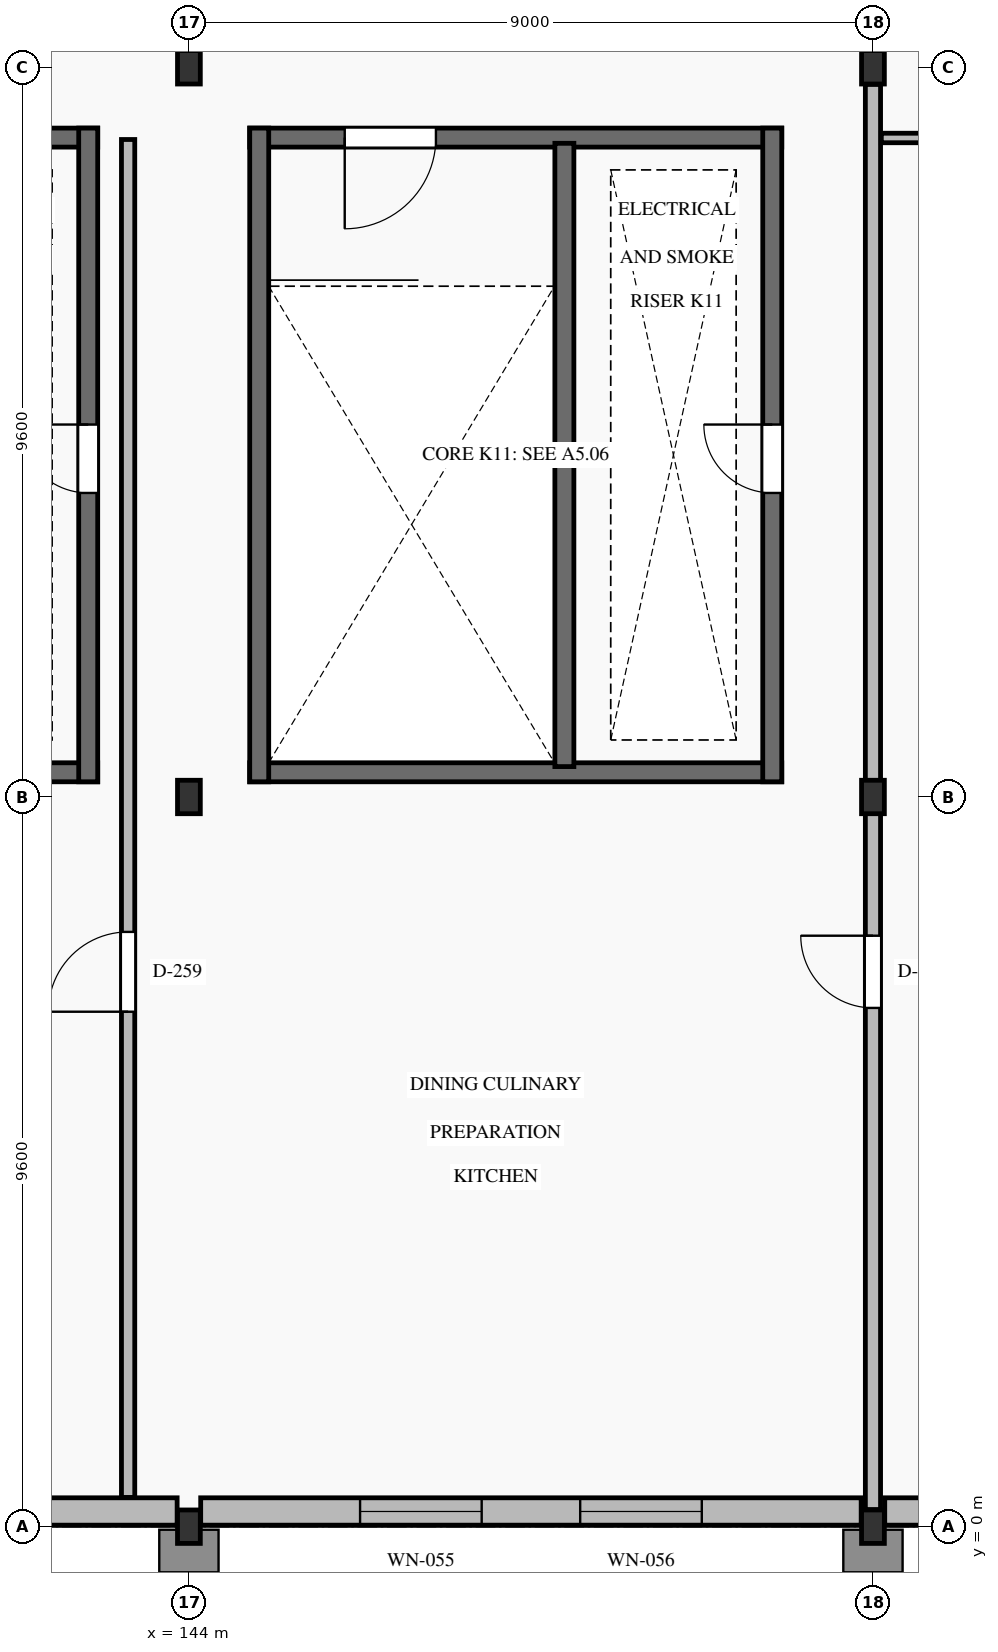
"""IFC4 building model, lengths in metres.
Left out: names, types, materials, properties, quantities, classifications, styles, units other than length and angle.
Written with IfcOpenShell. Run it as: python <this file> out.ifc"""

import sys

from ifc_helpers import new_model, si_unit, direction, frame, frame_2d, origin, origin_2d, place, context, subcontext, project, spatial, rectangle, i_section, extrude, element, fill, save


model = new_model("IFC4")
c1 = context("Model", 3, precision=1e-05, world=origin(), true_north=direction((0.0, 1.0)))
c2 = subcontext(c1, "Body", "Model", "MODEL_VIEW")
j1 = project(units=[si_unit("LENGTHUNIT", "METRE"), si_unit("PLANEANGLEUNIT", "RADIAN")], contexts=[c1])
p1 = place(None, origin())
s1 = spatial("IfcSite", under=j1, at=p1, CompositionType="ELEMENT")
p2 = place(p1, origin())
s2 = spatial("IfcBuilding", under=s1, at=p2, CompositionType="ELEMENT")
p3 = place(p2, frame((0.0, 0.0, 10.8)))
s3 = spatial("IfcBuildingStorey", under=s2, at=p3, CompositionType="ELEMENT", Elevation=10.8)
for number, where, z_axis, x_axis in (
    (1, (144.0, 0.0, 0.0), (0.0, 0.0, 1.0), (1.0, 0.0, 0.0)),
    (2, (144.0, 9.6, 0.0), (0.0, 0.0, 1.0), (1.0, 0.0, 0.0)),
    (3, (144.0, 19.2, 0.0), (0.0, 0.0, 1.0), (1.0, 0.0, 0.0)),
    (4, (153.0, 0.0, 0.0), (0.0, 0.0, 1.0), (1.0, 0.0, 0.0)),
    (5, (153.0, 9.6, 0.0), (0.0, 0.0, 1.0), (1.0, 0.0, 0.0)),
    (6, (153.0, 19.2, 0.0), (0.0, 0.0, 1.0), (1.0, 0.0, 0.0)),
):
    element("IfcColumn", number, at=place(p3, frame(where, z_axis=z_axis, x_axis=x_axis)), inside=s3, PredefinedType="COLUMN", context=c2, shape_type="SweptSolid", body=[
        extrude(i_section(OverallWidth=0.3, OverallDepth=0.44, WebThickness=0.011, FlangeThickness=0.021, FilletRadius=0.027, at=origin_2d()), origin(), (0.0, 0.0, 1.0), 4.2),
    ])
p4 = place(p3, frame((135.155, 0.2, 0.0), z_axis=(0.0, 0.0, 1.0), x_axis=(1.0, 0.0, 0.0)))
e7 = element("IfcWall", 7, at=p4, inside=s3, PredefinedType="SOLIDWALL", context=c2, shape_type="SweptSolid", body=[
    extrude(rectangle(XDim=8.69, YDim=0.36, at=frame_2d((4.345, 0.0))), origin(), (0.0, 0.0, 1.0), 3.69),
])
p5 = place(p4, frame((2.097, 0.0, 0.95)))
e8 = element("IfcOpeningElement", 8, at=p5, cuts=e7, PredefinedType="OPENING", context=c2, shape_type="SweptSolid", body=[
    extrude(rectangle(XDim=1.6, YDim=2.2, at=frame_2d((0.8, 1.1))), frame((0.0, 0.195, 0.0), z_axis=(0.0, -1.0, 0.0), x_axis=(1.0, 0.0, 0.0)), (0.0, 0.0, 1.0), 0.39),
])
p6 = place(p4, frame((4.993, 0.0, 0.95)))
e9 = element("IfcOpeningElement", 9, at=p6, cuts=e7, PredefinedType="OPENING", context=c2, shape_type="SweptSolid", body=[
    extrude(rectangle(XDim=1.6, YDim=2.2, at=frame_2d((0.8, 1.1))), frame((0.0, 0.195, 0.0), z_axis=(0.0, -1.0, 0.0), x_axis=(1.0, 0.0, 0.0)), (0.0, 0.0, 1.0), 0.39),
])
p7 = place(p3, frame((144.155, 0.2, 0.0), z_axis=(0.0, 0.0, 1.0), x_axis=(1.0, 0.0, 0.0)))
e10 = element("IfcWall", 10, at=p7, inside=s3, PredefinedType="SOLIDWALL", context=c2, shape_type="SweptSolid", body=[
    extrude(rectangle(XDim=8.69, YDim=0.36, at=frame_2d((4.345, 0.0))), origin(), (0.0, 0.0, 1.0), 3.665),
])
p8 = place(p7, frame((2.097, 0.0, 0.95)))
e11 = element("IfcOpeningElement", 11, at=p8, cuts=e10, PredefinedType="OPENING", context=c2, shape_type="SweptSolid", body=[
    extrude(rectangle(XDim=1.6, YDim=2.2, at=frame_2d((0.8, 1.1))), frame((0.0, 0.195, 0.0), z_axis=(0.0, -1.0, 0.0), x_axis=(1.0, 0.0, 0.0)), (0.0, 0.0, 1.0), 0.39),
])
p9 = place(p7, frame((4.993, 0.0, 0.95)))
e12 = element("IfcOpeningElement", 12, at=p9, cuts=e10, PredefinedType="OPENING", context=c2, shape_type="SweptSolid", body=[
    extrude(rectangle(XDim=1.6, YDim=2.2, at=frame_2d((0.8, 1.1))), frame((0.0, 0.195, 0.0), z_axis=(0.0, -1.0, 0.0), x_axis=(1.0, 0.0, 0.0)), (0.0, 0.0, 1.0), 0.39),
])
p10 = place(p3, frame((153.155, 0.2, 0.0), z_axis=(0.0, 0.0, 1.0), x_axis=(1.0, 0.0, 0.0)))
e13 = element("IfcWall", 13, at=p10, inside=s3, PredefinedType="SOLIDWALL", context=c2, shape_type="SweptSolid", body=[
    extrude(rectangle(XDim=8.69, YDim=0.36, at=frame_2d((4.345, 0.0))), origin(), (0.0, 0.0, 1.0), 3.665),
])
p11 = place(p10, frame((2.097, 0.0, 0.95)))
e14 = element("IfcOpeningElement", 14, at=p11, cuts=e13, PredefinedType="OPENING", context=c2, shape_type="SweptSolid", body=[
    extrude(rectangle(XDim=1.6, YDim=2.2, at=frame_2d((0.8, 1.1))), frame((0.0, 0.195, 0.0), z_axis=(0.0, -1.0, 0.0), x_axis=(1.0, 0.0, 0.0)), (0.0, 0.0, 1.0), 0.39),
])
p12 = place(p10, frame((4.993, 0.0, 0.95)))
e15 = element("IfcOpeningElement", 15, at=p12, cuts=e13, PredefinedType="OPENING", context=c2, shape_type="SweptSolid", body=[
    extrude(rectangle(XDim=1.6, YDim=2.2, at=frame_2d((0.8, 1.1))), frame((0.0, 0.195, 0.0), z_axis=(0.0, -1.0, 0.0), x_axis=(1.0, 0.0, 0.0)), (0.0, 0.0, 1.0), 0.39),
])
p13 = place(p3, frame((135.8, 9.925, 0.0), z_axis=(0.0, 0.0, 1.0), x_axis=(1.0, 0.0, 0.0)))
e16 = element("IfcWall", 16, at=p13, inside=s3, PredefinedType="SHEAR", context=c2, shape_type="SweptSolid", body=[
    extrude(rectangle(XDim=7.0, YDim=0.25, at=frame_2d((3.5, 0.0))), origin(), (0.0, 0.0, 1.0), 4.2),
])
p14 = place(p3, frame((135.8, 18.275, 0.0), z_axis=(0.0, 0.0, 1.0), x_axis=(1.0, 0.0, 0.0)))
e17 = element("IfcWall", 17, at=p14, inside=s3, PredefinedType="SHEAR", context=c2, shape_type="SweptSolid", body=[
    extrude(rectangle(XDim=7.0, YDim=0.25, at=frame_2d((3.5, 0.0))), origin(), (0.0, 0.0, 1.0), 4.2),
])
p15 = place(p14, frame((1.25, 0.0, 0.0)))
e18 = element("IfcOpeningElement", 18, at=p15, cuts=e17, PredefinedType="OPENING", context=c2, shape_type="SweptSolid", body=[
    extrude(rectangle(XDim=1.2, YDim=2.15, at=frame_2d((0.6, 1.075))), frame((0.0, 0.14, 0.0), z_axis=(0.0, -1.0, 0.0), x_axis=(1.0, 0.0, 0.0)), (0.0, 0.0, 1.0), 0.28),
])
p16 = place(p3, frame((142.675, 9.8, 0.0), z_axis=(0.0, 0.0, 1.0), x_axis=(0.0, 1.0, 0.0)))
e19 = element("IfcWall", 19, at=p16, inside=s3, PredefinedType="SHEAR", context=c2, shape_type="SweptSolid", body=[
    extrude(rectangle(XDim=8.6, YDim=0.25, at=frame_2d((4.3, 0.0))), origin(), (0.0, 0.0, 1.0), 4.2),
])
p17 = place(p16, frame((3.8, 0.0, 0.0)))
e20 = element("IfcOpeningElement", 20, at=p17, cuts=e19, PredefinedType="OPENING", context=c2, shape_type="SweptSolid", body=[
    extrude(rectangle(XDim=0.9, YDim=2.05, at=frame_2d((0.45, 1.025))), frame((0.0, 0.14, 0.0), z_axis=(0.0, -1.0, 0.0), x_axis=(1.0, 0.0, 0.0)), (0.0, 0.0, 1.0), 0.28),
])
p18 = place(p3, frame((144.8, 9.925, 0.0), z_axis=(0.0, 0.0, 1.0), x_axis=(1.0, 0.0, 0.0)))
e21 = element("IfcWall", 21, at=p18, inside=s3, PredefinedType="SHEAR", context=c2, shape_type="SweptSolid", body=[
    extrude(rectangle(XDim=7.0, YDim=0.25, at=frame_2d((3.5, 0.0))), origin(), (0.0, 0.0, 1.0), 4.2),
])
p19 = place(p3, frame((144.8, 18.275, 0.0), z_axis=(0.0, 0.0, 1.0), x_axis=(1.0, 0.0, 0.0)))
e22 = element("IfcWall", 22, at=p19, inside=s3, PredefinedType="SHEAR", context=c2, shape_type="SweptSolid", body=[
    extrude(rectangle(XDim=7.0, YDim=0.25, at=frame_2d((3.5, 0.0))), origin(), (0.0, 0.0, 1.0), 4.2),
])
p20 = place(p19, frame((1.25, 0.0, 0.0)))
e23 = element("IfcOpeningElement", 23, at=p20, cuts=e22, PredefinedType="OPENING", context=c2, shape_type="SweptSolid", body=[
    extrude(rectangle(XDim=1.2, YDim=2.15, at=frame_2d((0.6, 1.075))), frame((0.0, 0.14, 0.0), z_axis=(0.0, -1.0, 0.0), x_axis=(1.0, 0.0, 0.0)), (0.0, 0.0, 1.0), 0.28),
])
p21 = place(p3, frame((144.925, 9.8, 0.0), z_axis=(0.0, 0.0, 1.0), x_axis=(0.0, 1.0, 0.0)))
e24 = element("IfcWall", 24, at=p21, inside=s3, PredefinedType="SHEAR", context=c2, shape_type="SweptSolid", body=[
    extrude(rectangle(XDim=8.6, YDim=0.25, at=frame_2d((4.3, 0.0))), origin(), (0.0, 0.0, 1.0), 4.2),
])
p22 = place(p3, frame((151.675, 9.8, 0.0), z_axis=(0.0, 0.0, 1.0), x_axis=(0.0, 1.0, 0.0)))
e25 = element("IfcWall", 25, at=p22, inside=s3, PredefinedType="SHEAR", context=c2, shape_type="SweptSolid", body=[
    extrude(rectangle(XDim=8.6, YDim=0.25, at=frame_2d((4.3, 0.0))), origin(), (0.0, 0.0, 1.0), 4.2),
])
p23 = place(p22, frame((3.8, 0.0, 0.0)))
e26 = element("IfcOpeningElement", 26, at=p23, cuts=e25, PredefinedType="OPENING", context=c2, shape_type="SweptSolid", body=[
    extrude(rectangle(XDim=0.9, YDim=2.05, at=frame_2d((0.45, 1.025))), frame((0.0, 0.14, 0.0), z_axis=(0.0, -1.0, 0.0), x_axis=(1.0, 0.0, 0.0)), (0.0, 0.0, 1.0), 0.28),
])
p24 = place(p3, frame((148.94, 10.0, 0.0), z_axis=(0.0, 0.0, 1.0), x_axis=(0.0, 1.0, 0.0)))
e27 = element("IfcWall", 27, at=p24, inside=s3, PredefinedType="SHEAR", context=c2, shape_type="SweptSolid", body=[
    extrude(rectangle(XDim=8.2, YDim=0.25, at=frame_2d((4.1, 0.0))), origin(), (0.0, 0.0, 1.0), 4.2),
])
p25 = place(p3, frame((143.2, 0.385, 0.0), z_axis=(0.0, 0.0, 1.0), x_axis=(0.0, 1.0, 0.0)))
e28 = element("IfcWall", 28, at=p25, inside=s3, PredefinedType="PARTITIONING", context=c2, shape_type="SweptSolid", body=[
    extrude(rectangle(XDim=17.865, YDim=0.175, at=frame_2d((8.933, 0.0))), origin(), (0.0, 0.0, 1.0), 3.94),
])
p26 = place(p25, frame((6.39, 0.0, 0.0)))
e29 = element("IfcOpeningElement", 29, at=p26, cuts=e28, PredefinedType="OPENING", context=c2, shape_type="SweptSolid", body=[
    extrude(rectangle(XDim=1.05, YDim=2.2, at=frame_2d((0.525, 1.1))), frame((0.0, 0.103, 0.0), z_axis=(0.0, -1.0, 0.0), x_axis=(1.0, 0.0, 0.0)), (0.0, 0.0, 1.0), 0.205),
])
p27 = place(p3, frame((153.0, 0.225, 0.0), z_axis=(0.0, 0.0, 1.0), x_axis=(0.0, 1.0, 0.0)))
e30 = element("IfcWall", 30, at=p27, inside=s3, PredefinedType="PARTITIONING", context=c2, shape_type="SweptSolid", body=[
    extrude(rectangle(XDim=18.75, YDim=0.2, at=frame_2d((9.375, 0.0))), origin(), (0.0, 0.0, 1.0), 3.615),
])
p28 = place(p27, frame((6.6, 0.0, 0.0)))
e31 = element("IfcOpeningElement", 31, at=p28, cuts=e30, PredefinedType="OPENING", context=c2, shape_type="SweptSolid", body=[
    extrude(rectangle(XDim=0.95, YDim=2.1, at=frame_2d((0.475, 1.05))), frame((0.0, 0.115, 0.0), z_axis=(0.0, -1.0, 0.0), x_axis=(1.0, 0.0, 0.0)), (0.0, 0.0, 1.0), 0.23),
])
p29 = place(p3, frame((153.11, 18.27, 0.0), z_axis=(0.0, 0.0, 1.0), x_axis=(1.0, 0.0, 0.0)))
e32 = element("IfcWall", 32, at=p29, inside=s3, PredefinedType="PARTITIONING", context=c2, shape_type="SweptSolid", body=[
    extrude(rectangle(XDim=0.68, YDim=0.125, at=frame_2d((0.34, 0.0))), origin(), (0.0, 0.0, 1.0), 3.94),
])
p30 = place(p8, origin())
e33 = element("IfcWindow", 33, at=p30, inside=s3, PartitioningType="SINGLE_PANEL", PredefinedType="WINDOW", context=c2, shape_type="SweptSolid", body=[
    extrude(rectangle(XDim=1.6, YDim=2.2, at=frame_2d((0.8, 1.1))), frame((0.0, 0.03, 0.0), z_axis=(0.0, -1.0, 0.0), x_axis=(1.0, 0.0, 0.0)), (0.0, 0.0, 1.0), 0.06),
])
fill(e11, e33)
p31 = place(p9, origin())
e34 = element("IfcWindow", 34, at=p31, inside=s3, PartitioningType="SINGLE_PANEL", PredefinedType="WINDOW", context=c2, shape_type="SweptSolid", body=[
    extrude(rectangle(XDim=1.6, YDim=2.2, at=frame_2d((0.8, 1.1))), frame((0.0, 0.03, 0.0), z_axis=(0.0, -1.0, 0.0), x_axis=(1.0, 0.0, 0.0)), (0.0, 0.0, 1.0), 0.06),
])
fill(e12, e34)
p32 = place(p17, origin())
e35 = element("IfcDoor", 35, at=p32, inside=s3, OperationType="SINGLE_SWING_RIGHT", PredefinedType="DOOR", context=c2, shape_type="SweptSolid", body=[
    extrude(rectangle(XDim=0.9, YDim=2.05, at=frame_2d((0.45, 1.025))), frame((0.0, 0.025, 0.0), z_axis=(0.0, -1.0, 0.0), x_axis=(1.0, 0.0, 0.0)), (0.0, 0.0, 1.0), 0.05),
])
fill(e20, e35)
p33 = place(p20, frame((1.2, 0.0, 0.0), z_axis=(0.0, 0.0, 1.0), x_axis=(-1.0, 0.0, 0.0)))
e36 = element("IfcDoor", 36, at=p33, inside=s3, OperationType="SINGLE_SWING_LEFT", PredefinedType="DOOR", context=c2, shape_type="SweptSolid", body=[
    extrude(rectangle(XDim=1.2, YDim=2.15, at=frame_2d((0.6, 1.075))), frame((0.0, 0.025, 0.0), z_axis=(0.0, -1.0, 0.0), x_axis=(1.0, 0.0, 0.0)), (0.0, 0.0, 1.0), 0.05),
])
fill(e23, e36)
p34 = place(p23, origin())
e37 = element("IfcDoor", 37, at=p34, inside=s3, OperationType="SINGLE_SWING_RIGHT", PredefinedType="DOOR", context=c2, shape_type="SweptSolid", body=[
    extrude(rectangle(XDim=0.9, YDim=2.05, at=frame_2d((0.45, 1.025))), frame((0.0, 0.025, 0.0), z_axis=(0.0, -1.0, 0.0), x_axis=(1.0, 0.0, 0.0)), (0.0, 0.0, 1.0), 0.05),
])
fill(e26, e37)
p35 = place(p26, origin())
e38 = element("IfcDoor", 38, at=p35, inside=s3, OperationType="SINGLE_SWING_LEFT", PredefinedType="DOOR", context=c2, shape_type="SweptSolid", body=[
    extrude(rectangle(XDim=1.05, YDim=2.2, at=frame_2d((0.525, 1.1))), frame((0.0, 0.025, 0.0), z_axis=(0.0, -1.0, 0.0), x_axis=(1.0, 0.0, 0.0)), (0.0, 0.0, 1.0), 0.05),
])
fill(e29, e38)
p36 = place(p28, origin())
e39 = element("IfcDoor", 39, at=p36, inside=s3, OperationType="SINGLE_SWING_RIGHT", PredefinedType="DOOR", context=c2, shape_type="SweptSolid", body=[
    extrude(rectangle(XDim=0.95, YDim=2.1, at=frame_2d((0.475, 1.05))), frame((0.0, 0.025, 0.0), z_axis=(0.0, -1.0, 0.0), x_axis=(1.0, 0.0, 0.0)), (0.0, 0.0, 1.0), 0.05),
])
fill(e31, e39)
save(model, sys.argv[1])
